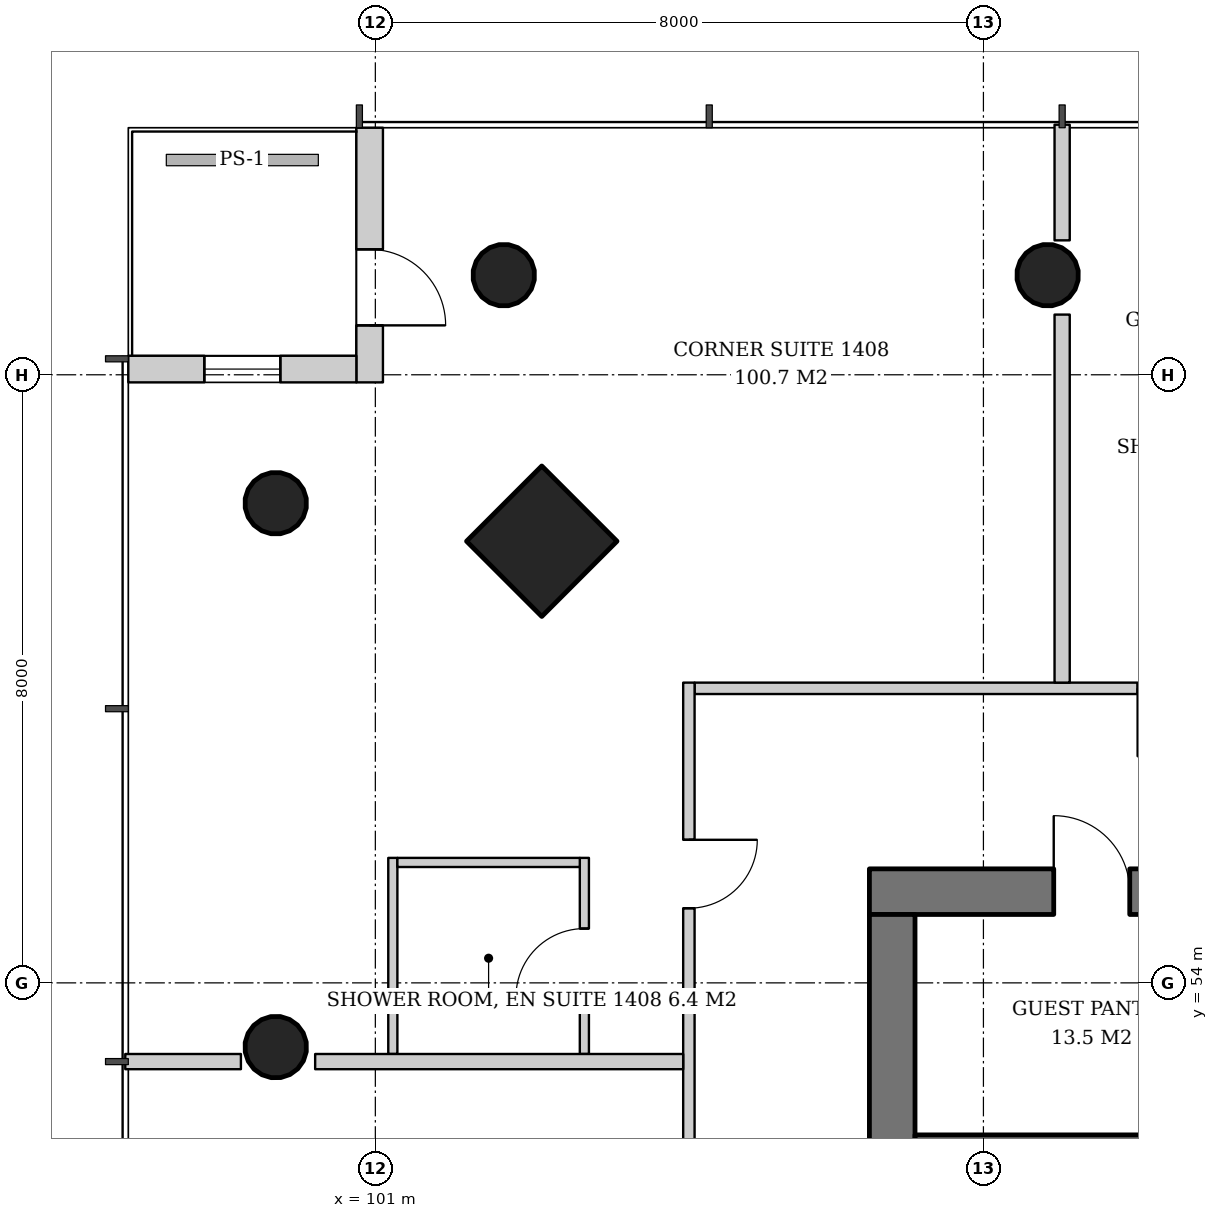
"""IFC4 building model, lengths in metres.
Left out: names, types, materials, properties, quantities, classifications, styles, units other than length and angle.
Written with IfcOpenShell. Run it as: python <this file> out.ifc"""

import sys

from ifc_helpers import new_model, si_unit, direction, frame, frame_2d, origin, origin_2d, place, context, subcontext, project, spatial, rectangle, hollow_circle, extrude, element, fill, save


model = new_model("IFC4")
c1 = context("Model", 3, precision=1e-05, world=origin(), true_north=direction((0.0, 1.0)))
c2 = subcontext(c1, "Body", "Model", "MODEL_VIEW")
j1 = project(units=[si_unit("LENGTHUNIT", "METRE"), si_unit("PLANEANGLEUNIT", "RADIAN")], contexts=[c1])
p1 = place(None, origin())
s1 = spatial("IfcSite", under=j1, at=p1, CompositionType="ELEMENT")
p2 = place(p1, origin())
s2 = spatial("IfcBuilding", under=s1, at=p2, CompositionType="ELEMENT")
p3 = place(p2, frame((0.0, 0.0, 59.0)))
s3 = spatial("IfcBuildingStorey", under=s2, at=p3, CompositionType="ELEMENT", Elevation=59.0)
p4 = place(p3, frame((103.138, 59.862, 0.0), z_axis=(0.043029647111, -0.043029647111, 0.998146732169), x_axis=(0.707106781187, 0.707106781187, 0.0)))
e1 = element("IfcColumn", 1, at=p4, inside=s3, PredefinedType="COLUMN", context=c2, shape_type="SweptSolid", body=[
    extrude(rectangle(XDim=1.4, YDim=1.4, at=origin_2d()), origin(), (0.0, 0.0, 1.0), 3.807),
])
p5 = place(p3, frame((102.638, 63.362, 0.0), z_axis=(0.043029647111, -0.043029647111, 0.998146732169), x_axis=(0.707106781187, 0.707106781187, 0.0)))
e2 = element("IfcColumn", 2, at=p5, inside=s3, PredefinedType="COLUMN", context=c2, shape_type="SweptSolid", body=[
    extrude(hollow_circle(Radius=0.406, WallThickness=0.03, at=origin_2d()), origin(), (0.0, 0.0, 1.0), 3.807),
])
p6 = place(p3, frame((109.819, 63.362, 0.0), z_axis=(0.021561848751, -0.043059525333, 0.998839808957), x_axis=(0.894160516368, 0.44774654769, 0.0)))
e3 = element("IfcColumn", 3, at=p6, inside=s3, PredefinedType="COLUMN", context=c2, shape_type="SweptSolid", body=[
    extrude(hollow_circle(Radius=0.406, WallThickness=0.03, at=origin_2d()), origin(), (0.0, 0.0, 1.0), 3.804),
])
p7 = place(p3, frame((99.638, 60.362, 0.0), z_axis=(0.043029647111, -0.043029647111, 0.998146732169), x_axis=(0.707106781187, 0.707106781187, 0.0)))
e4 = element("IfcColumn", 4, at=p7, inside=s3, PredefinedType="COLUMN", context=c2, shape_type="SweptSolid", body=[
    extrude(hollow_circle(Radius=0.406, WallThickness=0.03, at=origin_2d()), origin(), (0.0, 0.0, 1.0), 3.807),
])
p8 = place(p3, frame((99.638, 53.181, 0.0), z_axis=(0.043059525333, -0.021561848751, 0.998839808957), x_axis=(0.44774654769, 0.894160516368, 0.0)))
e5 = element("IfcColumn", 5, at=p8, inside=s3, PredefinedType="COLUMN", context=c2, shape_type="SweptSolid", body=[
    extrude(hollow_circle(Radius=0.406, WallThickness=0.03, at=origin_2d()), origin(), (0.0, 0.0, 1.0), 3.804),
])
p9 = place(p3, frame((107.5, 55.2, 0.0), z_axis=(0.0, 0.0, 1.0), x_axis=(1.0, 0.0, 0.0)))
e6 = element("IfcWall", 6, at=p9, inside=s3, PredefinedType="SHEAR", context=c2, shape_type="SweptSolid", body=[
    extrude(rectangle(XDim=19.0, YDim=0.6, at=frame_2d((9.5, 0.0))), origin(), (0.0, 0.0, 1.0), 3.8),
])
p10 = place(p9, frame((14.14, 0.0, 0.0)))
e7 = element("IfcOpeningElement", 7, at=p10, cuts=e6, PredefinedType="OPENING", context=c2, shape_type="SweptSolid", body=[
    extrude(rectangle(XDim=1.0, YDim=2.1, at=frame_2d((0.5, 1.05))), frame((0.0, 0.31, 0.0), z_axis=(0.0, -1.0, 0.0), x_axis=(1.0, 0.0, 0.0)), (0.0, 0.0, 1.0), 0.62),
])
p11 = place(p9, frame((2.425, 0.0, 0.0)))
e8 = element("IfcOpeningElement", 8, at=p11, cuts=e6, PredefinedType="OPENING", context=c2, shape_type="SweptSolid", body=[
    extrude(rectangle(XDim=1.0, YDim=2.1, at=frame_2d((0.5, 1.05))), frame((0.0, 0.31, 0.0), z_axis=(0.0, -1.0, 0.0), x_axis=(1.0, 0.0, 0.0)), (0.0, 0.0, 1.0), 0.62),
])
p12 = place(p3, frame((107.8, 37.1, 0.0), z_axis=(0.0, 0.0, 1.0), x_axis=(0.0, 1.0, 0.0)))
e9 = element("IfcWall", 9, at=p12, inside=s3, PredefinedType="SHEAR", context=c2, shape_type="SweptSolid", body=[
    extrude(rectangle(XDim=17.8, YDim=0.6, at=frame_2d((8.9, 0.0))), origin(), (0.0, 0.0, 1.0), 3.8),
])
p13 = place(p12, frame((8.0, 0.0, 0.0)))
e10 = element("IfcOpeningElement", 10, at=p13, cuts=e9, PredefinedType="OPENING", context=c2, shape_type="SweptSolid", body=[
    extrude(rectangle(XDim=1.8, YDim=2.4, at=frame_2d((0.9, 1.2))), frame((0.0, 0.31, 0.0), z_axis=(0.0, -1.0, 0.0), x_axis=(1.0, 0.0, 0.0)), (0.0, 0.0, 1.0), 0.62),
])
p14 = place(p3, frame((108.1, 51.8, 0.0), z_axis=(0.0, 0.0, 1.0), x_axis=(1.0, 0.0, 0.0)))
e11 = element("IfcWall", 11, at=p14, inside=s3, PredefinedType="SHEAR", context=c2, shape_type="SweptSolid", body=[
    extrude(rectangle(XDim=17.8, YDim=0.4, at=frame_2d((8.9, 0.0))), origin(), (0.0, 0.0, 1.0), 3.8),
])
p15 = place(p3, frame((100.925, 65.25, 0.0), z_axis=(0.0, 0.0, 1.0), x_axis=(0.0, -1.0, 0.0)))
e12 = element("IfcWall", 12, at=p15, inside=s3, PredefinedType="SOLIDWALL", context=c2, shape_type="SweptSolid", body=[
    extrude(rectangle(XDim=3.35, YDim=0.35, at=frame_2d((1.675, 0.0))), origin(), (0.0, 0.0, 1.0), 3.6),
])
p16 = place(p15, frame((1.6, 0.0, 0.0)))
e13 = element("IfcOpeningElement", 13, at=p16, cuts=e12, PredefinedType="OPENING", context=c2, shape_type="SweptSolid", body=[
    extrude(rectangle(XDim=1.0, YDim=2.4, at=frame_2d((0.5, 1.2))), frame((0.0, 0.185, 0.0), z_axis=(0.0, -1.0, 0.0), x_axis=(1.0, 0.0, 0.0)), (0.0, 0.0, 1.0), 0.37),
])
p17 = place(p3, frame((100.75, 62.075, 0.0), z_axis=(0.0, 0.0, 1.0), x_axis=(-1.0, 0.0, 0.0)))
e14 = element("IfcWall", 14, at=p17, inside=s3, PredefinedType="SOLIDWALL", context=c2, shape_type="SweptSolid", body=[
    extrude(rectangle(XDim=3.0, YDim=0.35, at=frame_2d((1.5, 0.0))), origin(), (0.0, 0.0, 1.0), 3.6),
])
p18 = place(p17, frame((1.0, 0.0, 0.9)))
e15 = element("IfcOpeningElement", 15, at=p18, cuts=e14, PredefinedType="OPENING", context=c2, shape_type="SweptSolid", body=[
    extrude(rectangle(XDim=1.0, YDim=2.4, at=frame_2d((0.5, 1.2))), frame((0.0, 0.185, 0.0), z_axis=(0.0, -1.0, 0.0), x_axis=(1.0, 0.0, 0.0)), (0.0, 0.0, 1.0), 0.37),
])
p19 = place(p3, frame((128.95, 57.875, 0.0), z_axis=(0.0, 0.0, 1.0), x_axis=(-1.0, 0.0, 0.0)))
e16 = element("IfcWall", 16, at=p19, inside=s3, PredefinedType="PARTITIONING", context=c2, shape_type="SweptSolid", body=[
    extrude(rectangle(XDim=23.75, YDim=0.15, at=frame_2d((11.875, 0.0))), origin(), (0.0, 0.0, 1.0), 2.8),
])
p20 = place(p19, frame((2.068, 0.0, 0.0)))
e17 = element("IfcOpeningElement", 17, at=p20, cuts=e16, PredefinedType="OPENING", context=c2, shape_type="SweptSolid", body=[
    extrude(rectangle(XDim=0.9, YDim=2.1, at=frame_2d((0.45, 1.05))), frame((0.0, 0.085, 0.0), z_axis=(0.0, -1.0, 0.0), x_axis=(1.0, 0.0, 0.0)), (0.0, 0.0, 1.0), 0.17),
])
p21 = place(p19, frame((7.736, 0.0, 0.0)))
e18 = element("IfcOpeningElement", 18, at=p21, cuts=e16, PredefinedType="OPENING", context=c2, shape_type="SweptSolid", body=[
    extrude(rectangle(XDim=0.9, YDim=2.1, at=frame_2d((0.45, 1.05))), frame((0.0, 0.085, 0.0), z_axis=(0.0, -1.0, 0.0), x_axis=(1.0, 0.0, 0.0)), (0.0, 0.0, 1.0), 0.17),
])
p22 = place(p19, frame((10.621, 0.0, 0.0)))
e19 = element("IfcOpeningElement", 19, at=p22, cuts=e16, PredefinedType="OPENING", context=c2, shape_type="SweptSolid", body=[
    extrude(rectangle(XDim=0.9, YDim=2.1, at=frame_2d((0.45, 1.05))), frame((0.0, 0.085, 0.0), z_axis=(0.0, -1.0, 0.0), x_axis=(1.0, 0.0, 0.0)), (0.0, 0.0, 1.0), 0.17),
])
p23 = place(p19, frame((17.021, 0.0, 0.0)))
e20 = element("IfcOpeningElement", 20, at=p23, cuts=e16, PredefinedType="OPENING", context=c2, shape_type="SweptSolid", body=[
    extrude(rectangle(XDim=0.9, YDim=2.1, at=frame_2d((0.45, 1.05))), frame((0.0, 0.085, 0.0), z_axis=(0.0, -1.0, 0.0), x_axis=(1.0, 0.0, 0.0)), (0.0, 0.0, 1.0), 0.17),
])
p24 = place(p3, frame((110.036, 57.95, 0.0), z_axis=(0.0, 0.0, 1.0), x_axis=(0.0, 1.0, 0.0)))
e21 = element("IfcWall", 21, at=p24, inside=s3, PredefinedType="PARTITIONING", context=c2, shape_type="SweptSolid", body=[
    extrude(rectangle(XDim=4.842, YDim=0.2, at=frame_2d((2.421, 0.0))), origin(), (0.0, 0.0, 1.0), 3.6),
])
p25 = place(p3, frame((110.036, 63.769, 0.0), z_axis=(0.0, 0.0, 1.0), x_axis=(0.0, 1.0, 0.0)))
e22 = element("IfcWall", 22, at=p25, inside=s3, PredefinedType="PARTITIONING", context=c2, shape_type="SweptSolid", body=[
    extrude(rectangle(XDim=1.521, YDim=0.2, at=frame_2d((0.761, 0.0))), origin(), (0.0, 0.0, 1.0), 3.6),
])
p26 = place(p3, frame((103.75, 53.064, 0.0), z_axis=(0.0, 0.0, 1.0), x_axis=(0.0, 1.0, 0.0)))
e23 = element("IfcWall", 23, at=p26, inside=s3, PredefinedType="PARTITIONING", context=c2, shape_type="SweptSolid", body=[
    extrude(rectangle(XDim=2.58, YDim=0.12, at=frame_2d((1.29, 0.0))), origin(), (0.0, 0.0, 1.0), 2.8),
])
p27 = place(p26, frame((0.75, 0.0, 0.0)))
e24 = element("IfcOpeningElement", 24, at=p27, cuts=e23, PredefinedType="OPENING", context=c2, shape_type="SweptSolid", body=[
    extrude(rectangle(XDim=0.9, YDim=2.1, at=frame_2d((0.45, 1.05))), frame((0.0, 0.07, 0.0), z_axis=(0.0, -1.0, 0.0), x_axis=(1.0, 0.0, 0.0)), (0.0, 0.0, 1.0), 0.14),
])
p28 = place(p3, frame((101.23, 53.064, 0.0), z_axis=(0.0, 0.0, 1.0), x_axis=(0.0, 1.0, 0.0)))
e25 = element("IfcWall", 25, at=p28, inside=s3, PredefinedType="PARTITIONING", context=c2, shape_type="SweptSolid", body=[
    extrude(rectangle(XDim=2.58, YDim=0.12, at=frame_2d((1.29, 0.0))), origin(), (0.0, 0.0, 1.0), 2.8),
])
p29 = place(p3, frame((103.69, 55.584, 0.0), z_axis=(0.0, 0.0, 1.0), x_axis=(-1.0, 0.0, 0.0)))
e26 = element("IfcWall", 26, at=p29, inside=s3, PredefinedType="PARTITIONING", context=c2, shape_type="SweptSolid", body=[
    extrude(rectangle(XDim=2.4, YDim=0.12, at=frame_2d((1.2, 0.0))), origin(), (0.0, 0.0, 1.0), 3.6),
])
p30 = place(p3, frame((105.125, 57.95, 0.0), z_axis=(0.0, 0.0, 1.0), x_axis=(0.0, -1.0, 0.0)))
e27 = element("IfcWall", 27, at=p30, inside=s3, PredefinedType="PARTITIONING", context=c2, shape_type="SweptSolid", body=[
    extrude(rectangle(XDim=23.75, YDim=0.15, at=frame_2d((11.875, 0.0))), origin(), (0.0, 0.0, 1.0), 2.8),
])
p31 = place(p30, frame((2.068, 0.0, 0.0)))
e28 = element("IfcOpeningElement", 28, at=p31, cuts=e27, PredefinedType="OPENING", context=c2, shape_type="SweptSolid", body=[
    extrude(rectangle(XDim=0.9, YDim=2.1, at=frame_2d((0.45, 1.05))), frame((0.0, 0.085, 0.0), z_axis=(0.0, -1.0, 0.0), x_axis=(1.0, 0.0, 0.0)), (0.0, 0.0, 1.0), 0.17),
])
p32 = place(p30, frame((7.686, 0.0, 0.0)))
e29 = element("IfcOpeningElement", 29, at=p32, cuts=e27, PredefinedType="OPENING", context=c2, shape_type="SweptSolid", body=[
    extrude(rectangle(XDim=1.0, YDim=2.1, at=frame_2d((0.5, 1.05))), frame((0.0, 0.085, 0.0), z_axis=(0.0, -1.0, 0.0), x_axis=(1.0, 0.0, 0.0)), (0.0, 0.0, 1.0), 0.17),
])
p33 = place(p30, frame((12.379, 0.0, 0.0)))
e30 = element("IfcOpeningElement", 30, at=p33, cuts=e27, PredefinedType="OPENING", context=c2, shape_type="SweptSolid", body=[
    extrude(rectangle(XDim=0.9, YDim=2.1, at=frame_2d((0.45, 1.05))), frame((0.0, 0.085, 0.0), z_axis=(0.0, -1.0, 0.0), x_axis=(1.0, 0.0, 0.0)), (0.0, 0.0, 1.0), 0.17),
])
p34 = place(p30, frame((15.264, 0.0, 0.0)))
e31 = element("IfcOpeningElement", 31, at=p34, cuts=e27, PredefinedType="OPENING", context=c2, shape_type="SweptSolid", body=[
    extrude(rectangle(XDim=0.9, YDim=2.1, at=frame_2d((0.45, 1.05))), frame((0.0, 0.085, 0.0), z_axis=(0.0, -1.0, 0.0), x_axis=(1.0, 0.0, 0.0)), (0.0, 0.0, 1.0), 0.17),
])
p35 = place(p3, frame((105.05, 52.964, 0.0), z_axis=(0.0, 0.0, 1.0), x_axis=(-1.0, 0.0, 0.0)))
e32 = element("IfcWall", 32, at=p35, inside=s3, PredefinedType="PARTITIONING", context=c2, shape_type="SweptSolid", body=[
    extrude(rectangle(XDim=4.842, YDim=0.2, at=frame_2d((2.421, 0.0))), origin(), (0.0, 0.0, 1.0), 3.6),
])
p36 = place(p3, frame((99.231, 52.964, 0.0), z_axis=(0.0, 0.0, 1.0), x_axis=(-1.0, 0.0, 0.0)))
e33 = element("IfcWall", 33, at=p36, inside=s3, PredefinedType="PARTITIONING", context=c2, shape_type="SweptSolid", body=[
    extrude(rectangle(XDim=1.521, YDim=0.2, at=frame_2d((0.761, 0.0))), origin(), (0.0, 0.0, 1.0), 3.6),
])
p37 = place(p16, origin())
e34 = element("IfcDoor", 34, at=p37, inside=s3, OperationType="SINGLE_SWING_RIGHT", PredefinedType="DOOR", context=c2, shape_type="SweptSolid", body=[
    extrude(rectangle(XDim=1.0, YDim=2.4, at=frame_2d((0.5, 1.2))), frame((0.0, 0.025, 0.0), z_axis=(0.0, -1.0, 0.0), x_axis=(1.0, 0.0, 0.0)), (0.0, 0.0, 1.0), 0.05),
])
fill(e13, e34)
p38 = place(p18, origin())
e35 = element("IfcWindow", 35, at=p38, inside=s3, PartitioningType="SINGLE_PANEL", PredefinedType="WINDOW", context=c2, shape_type="SweptSolid", body=[
    extrude(rectangle(XDim=1.0, YDim=2.4, at=frame_2d((0.5, 1.2))), frame((0.0, 0.03, 0.0), z_axis=(0.0, -1.0, 0.0), x_axis=(1.0, 0.0, 0.0)), (0.0, 0.0, 1.0), 0.06),
])
fill(e15, e35)
p39 = place(p11, origin())
e36 = element("IfcDoor", 36, at=p39, inside=s3, OperationType="SINGLE_SWING_LEFT", PredefinedType="DOOR", context=c2, shape_type="SweptSolid", body=[
    extrude(rectangle(XDim=1.0, YDim=2.1, at=frame_2d((0.5, 1.05))), frame((0.0, -0.24, 0.0), z_axis=(0.0, -1.0, 0.0), x_axis=(1.0, 0.0, 0.0)), (0.0, 0.0, 1.0), 0.05),
])
fill(e8, e36)
p40 = place(p23, origin())
e37 = element("IfcDoor", 37, at=p40, inside=s3, OperationType="SINGLE_SWING_RIGHT", PredefinedType="DOOR", context=c2, shape_type="SweptSolid", body=[
    extrude(rectangle(XDim=0.9, YDim=2.1, at=frame_2d((0.45, 1.05))), frame((0.0, 0.025, 0.0), z_axis=(0.0, -1.0, 0.0), x_axis=(1.0, 0.0, 0.0)), (0.0, 0.0, 1.0), 0.05),
])
fill(e20, e37)
p41 = place(p27, origin())
e38 = element("IfcDoor", 38, at=p41, inside=s3, OperationType="SINGLE_SWING_LEFT", PredefinedType="DOOR", context=c2, shape_type="SweptSolid", body=[
    extrude(rectangle(XDim=0.9, YDim=2.1, at=frame_2d((0.45, 1.05))), frame((0.0, 0.025, 0.0), z_axis=(0.0, -1.0, 0.0), x_axis=(1.0, 0.0, 0.0)), (0.0, 0.0, 1.0), 0.05),
])
fill(e24, e38)
p42 = place(p31, origin())
e39 = element("IfcDoor", 39, at=p42, inside=s3, OperationType="SINGLE_SWING_LEFT", PredefinedType="DOOR", context=c2, shape_type="SweptSolid", body=[
    extrude(rectangle(XDim=0.9, YDim=2.1, at=frame_2d((0.45, 1.05))), frame((0.0, 0.025, 0.0), z_axis=(0.0, -1.0, 0.0), x_axis=(1.0, 0.0, 0.0)), (0.0, 0.0, 1.0), 0.05),
])
fill(e28, e39)
save(model, sys.argv[1])
